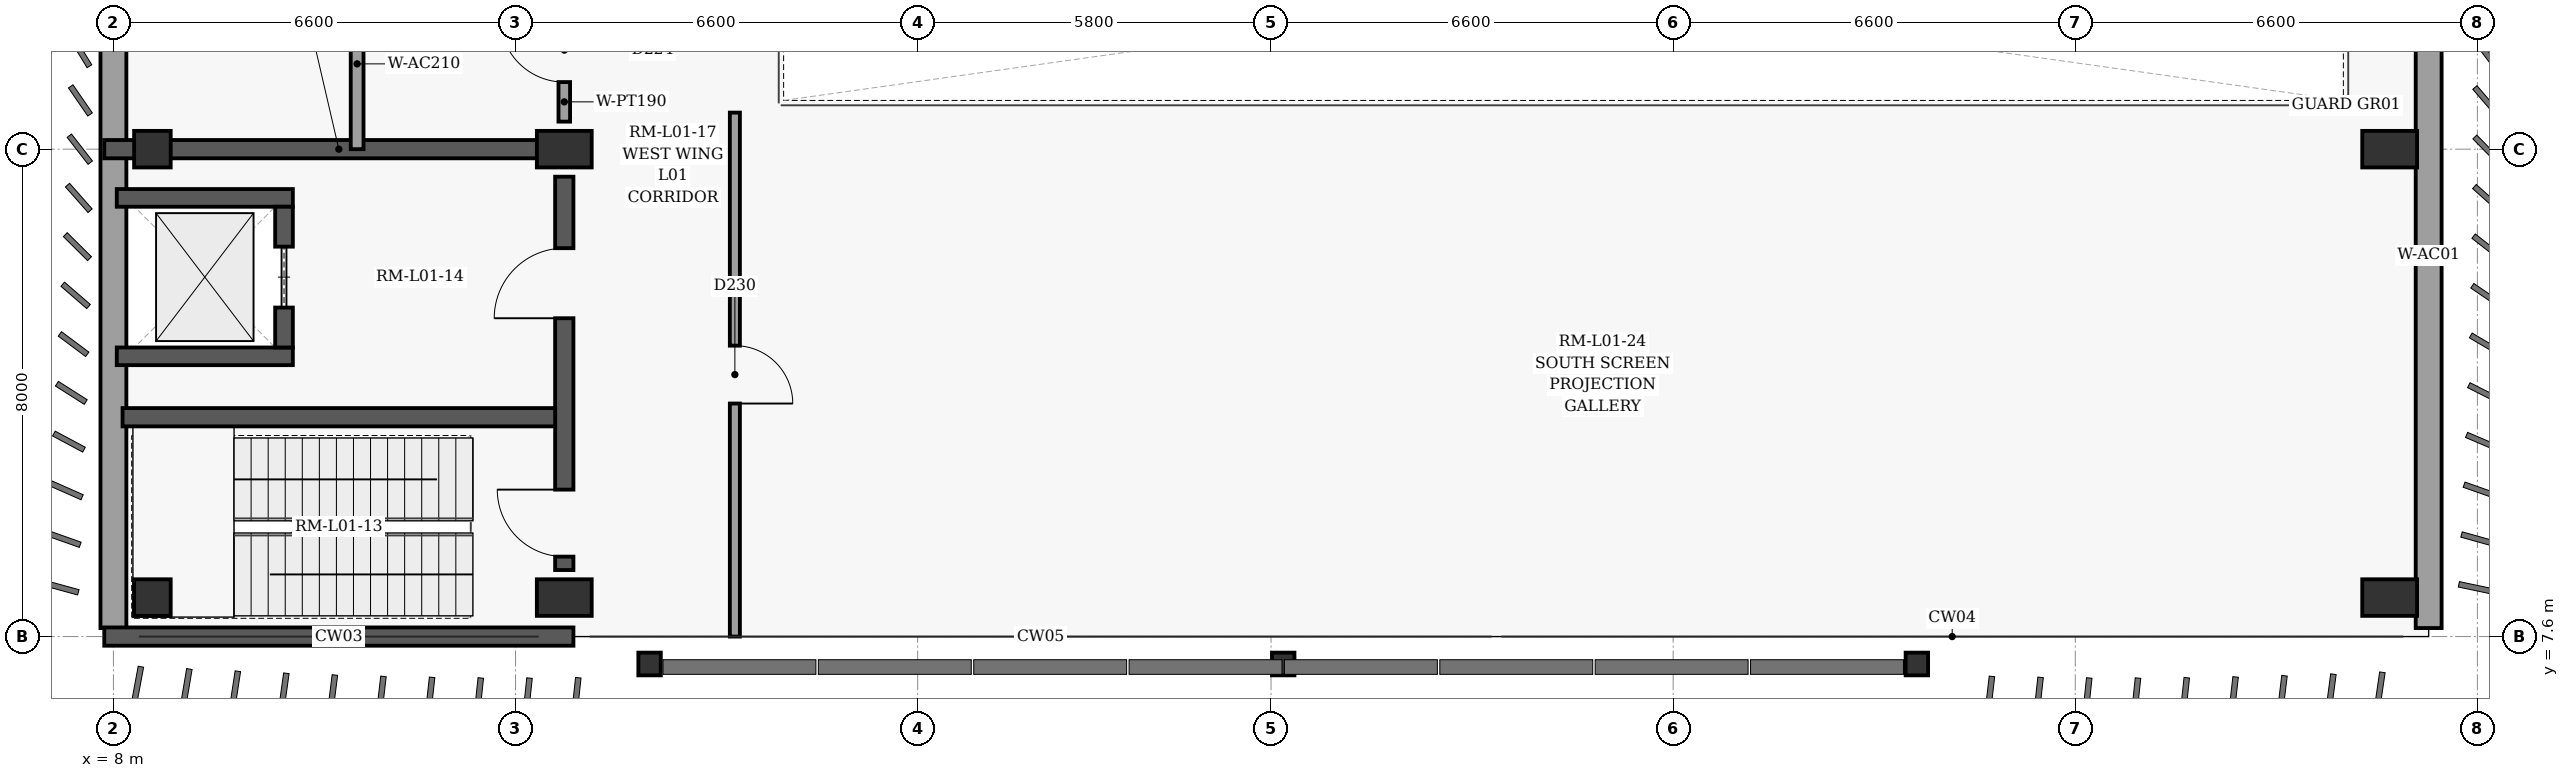
"""IFC4 building model, lengths in metres.
Left out: names, types, materials, properties, quantities, classifications, styles, units other than length and angle.
Written with IfcOpenShell. Run it as: python <this file> out.ifc"""

import sys

from ifc_helpers import new_model, si_unit, direction, frame, frame_2d, origin, origin_2d, place, context, subcontext, project, spatial, rectangle, i_section, extrude, element, fill, save


model = new_model("IFC4")
c1 = context("Model", 3, precision=1e-05, world=origin(), true_north=direction((0.0, 1.0)))
c2 = subcontext(c1, "Body", "Model", "MODEL_VIEW")
j1 = project(units=[si_unit("LENGTHUNIT", "METRE"), si_unit("PLANEANGLEUNIT", "RADIAN")], contexts=[c1])
p1 = place(None, origin())
s1 = spatial("IfcSite", under=j1, at=p1, CompositionType="ELEMENT")
p2 = place(p1, origin())
s2 = spatial("IfcBuilding", under=s1, at=p2, CompositionType="ELEMENT")
p3 = place(p2, frame((0.0, 0.0, 5.4)))
s3 = spatial("IfcBuildingStorey", under=s2, at=p3, CompositionType="ELEMENT", Elevation=5.4)
for number, where, z_axis, x_axis in (
    (1, (8.64, 8.24, 0.0), (0.0, 0.0, 1.0), (1.0, 0.0, 0.0)),
    (2, (8.64, 15.6, 0.0), (0.0, 0.0, 1.0), (1.0, 0.0, 0.0)),
):
    element("IfcColumn", number, at=place(p3, frame(where, z_axis=z_axis, x_axis=x_axis)), inside=s3, PredefinedType="COLUMN", context=c2, shape_type="SweptSolid", body=[
        extrude(rectangle(XDim=0.6, YDim=0.6, at=origin_2d()), origin(), (0.0, 0.0, 1.0), 4.8),
    ])
for number, where, z_axis, x_axis in (
    (3, (15.4, 8.24, 0.0), (0.0, 0.0, 1.0), (1.0, 0.0, 0.0)),
    (4, (15.4, 15.6, 0.0), (0.0, 0.0, 1.0), (1.0, 0.0, 0.0)),
    (5, (45.36, 8.24, 0.0), (0.0, 0.0, 1.0), (1.0, 0.0, 0.0)),
    (6, (45.36, 15.6, 0.0), (0.0, 0.0, 1.0), (1.0, 0.0, 0.0)),
):
    element("IfcColumn", number, at=place(p3, frame(where, z_axis=z_axis, x_axis=x_axis)), inside=s3, PredefinedType="COLUMN", context=c2, shape_type="SweptSolid", body=[
        extrude(rectangle(XDim=0.6, YDim=0.9, at=origin_2d()), origin(), (0.0, 0.0, 1.0), 4.8),
    ])
for number, where, z_axis, x_axis in (
    (7, (16.8, 7.15, 0.0), (0.0, 0.0, 1.0), (1.0, 0.0, 0.0)),
    (8, (27.2, 7.15, 0.0), (0.0, 0.0, 1.0), (1.0, 0.0, 0.0)),
    (9, (37.6, 7.15, 0.0), (0.0, 0.0, 1.0), (1.0, 0.0, 0.0)),
):
    element("IfcColumn", number, at=place(p3, frame(where, z_axis=z_axis, x_axis=x_axis)), inside=s3, PredefinedType="COLUMN", context=c2, shape_type="SweptSolid", body=[
        extrude(i_section(OverallWidth=0.373, OverallDepth=0.368, WebThickness=0.014, FlangeThickness=0.024, at=origin_2d()), origin(), (0.0, 0.0, 1.0), 4.8),
    ])
for number, where, z_axis, x_axis in (
    (10, (46.0, 63.46, 0.0), (0.0, 0.0, 1.0), (0.0, -1.0, 0.0)),
    (11, (8.0, 7.74, 0.0), (0.0, 0.0, 1.0), (0.0, 1.0, 0.0)),
):
    element("IfcWall", number, at=place(p3, frame(where, z_axis=z_axis, x_axis=x_axis)), inside=s3, PredefinedType="SOLIDWALL", context=c2, shape_type="SweptSolid", body=[
        extrude(rectangle(XDim=55.72, YDim=0.425, at=frame_2d((27.86, 0.0))), origin(), (0.0, 0.0, 1.0), 4.52),
    ])
p4 = place(p3, frame((7.85, 7.6, 0.0), z_axis=(0.0, 0.0, 1.0), x_axis=(1.0, 0.0, 0.0)))
e12 = element("IfcWall", 12, at=p4, inside=s3, PredefinedType="SHEAR", context=c2, shape_type="SweptSolid", body=[
    extrude(rectangle(XDim=7.7, YDim=0.3, at=frame_2d((3.85, 0.0))), origin(), (0.0, 0.0, 1.0), 4.52),
])
p5 = place(p3, frame((7.85, 15.6, 0.0), z_axis=(0.0, 0.0, 1.0), x_axis=(1.0, 0.0, 0.0)))
e13 = element("IfcWall", 13, at=p5, inside=s3, PredefinedType="SHEAR", context=c2, shape_type="SweptSolid", body=[
    extrude(rectangle(XDim=7.248, YDim=0.3, at=frame_2d((3.624, 0.0))), origin(), (0.0, 0.0, 1.0), 4.52),
])
p6 = place(p3, frame((15.4, 8.692, 0.0), z_axis=(0.0, 0.0, 1.0), x_axis=(0.0, 1.0, 0.0)))
e14 = element("IfcWall", 14, at=p6, inside=s3, PredefinedType="SHEAR", context=c2, shape_type="SweptSolid", body=[
    extrude(rectangle(XDim=6.456, YDim=0.3, at=frame_2d((3.228, 0.0))), origin(), (0.0, 0.0, 1.0), 4.52),
])
p7 = place(p6, frame((0.22, 0.0, 0.0)))
e15 = element("IfcOpeningElement", 15, at=p7, cuts=e14, PredefinedType="OPENING", context=c2, shape_type="SweptSolid", body=[
    extrude(rectangle(XDim=1.1, YDim=2.15, at=frame_2d((0.55, 1.075))), frame((0.0, 0.16, 0.0), z_axis=(0.0, -1.0, 0.0), x_axis=(1.0, 0.0, 0.0)), (0.0, 0.0, 1.0), 0.32),
])
p8 = place(p6, frame((4.133, 0.0, 0.0)))
e16 = element("IfcOpeningElement", 16, at=p8, cuts=e14, PredefinedType="OPENING", context=c2, shape_type="SweptSolid", body=[
    extrude(rectangle(XDim=1.15, YDim=2.2, at=frame_2d((0.575, 1.1))), frame((0.0, 0.16, 0.0), z_axis=(0.0, -1.0, 0.0), x_axis=(1.0, 0.0, 0.0)), (0.0, 0.0, 1.0), 0.32),
])
p9 = place(p3, frame((8.15, 11.2, 0.0), z_axis=(0.0, 0.0, 1.0), x_axis=(1.0, 0.0, 0.0)))
e17 = element("IfcWall", 17, at=p9, inside=s3, PredefinedType="SHEAR", context=c2, shape_type="SweptSolid", body=[
    extrude(rectangle(XDim=7.1, YDim=0.3, at=frame_2d((3.55, 0.0))), origin(), (0.0, 0.0, 1.0), 4.52),
])
for number, where, z_axis, x_axis in (
    (18, (8.055, 12.2, 0.0), (0.0, 0.0, 1.0), (1.0, 0.0, 0.0)),
    (19, (8.055, 14.8, 0.0), (0.0, 0.0, 1.0), (1.0, 0.0, 0.0)),
):
    element("IfcWall", number, at=place(p3, frame(where, z_axis=z_axis, x_axis=x_axis)), inside=s3, PredefinedType="SHEAR", context=c2, shape_type="SweptSolid", body=[
        extrude(rectangle(XDim=2.89, YDim=0.29, at=frame_2d((1.445, 0.0))), origin(), (0.0, 0.0, 1.0), 4.52),
    ])
p10 = place(p3, frame((10.8, 12.345, 0.0), z_axis=(0.0, 0.0, 1.0), x_axis=(0.0, 1.0, 0.0)))
e20 = element("IfcWall", 20, at=p10, inside=s3, PredefinedType="SHEAR", context=c2, shape_type="SweptSolid", body=[
    extrude(rectangle(XDim=2.31, YDim=0.29, at=frame_2d((1.155, 0.0))), origin(), (0.0, 0.0, 1.0), 4.52),
])
p11 = place(p10, frame((0.655, 0.0, 0.0)))
e21 = element("IfcOpeningElement", 21, at=p11, cuts=e20, PredefinedType="OPENING", context=c2, shape_type="SweptSolid", body=[
    extrude(rectangle(XDim=1.0, YDim=2.15, at=frame_2d((0.5, 1.075))), frame((0.0, 0.155, 0.0), z_axis=(0.0, -1.0, 0.0), x_axis=(1.0, 0.0, 0.0)), (0.0, 0.0, 1.0), 0.31),
])
p12 = place(p3, frame((15.4, 16.052, 0.0), z_axis=(0.0, 0.0, 1.0), x_axis=(0.0, 1.0, 0.0)))
e22 = element("IfcWall", 22, at=p12, inside=s3, PredefinedType="PARTITIONING", context=c2, shape_type="SweptSolid", body=[
    extrude(rectangle(XDim=2.348, YDim=0.19, at=frame_2d((1.174, 0.0))), origin(), (0.0, 0.0, 1.0), 3.67),
])
p13 = place(p12, frame((0.649, 0.0, 0.0)))
e23 = element("IfcOpeningElement", 23, at=p13, cuts=e22, PredefinedType="OPENING", context=c2, shape_type="SweptSolid", body=[
    extrude(rectangle(XDim=1.05, YDim=2.15, at=frame_2d((0.525, 1.075))), frame((0.0, 0.105, 0.0), z_axis=(0.0, -1.0, 0.0), x_axis=(1.0, 0.0, 0.0)), (0.0, 0.0, 1.0), 0.21),
])
p14 = place(p3, frame((18.2, 16.2, 0.0), z_axis=(0.0, 0.0, 1.0), x_axis=(0.0, -1.0, 0.0)))
e24 = element("IfcWall", 24, at=p14, inside=s3, PredefinedType="PARTITIONING", context=c2, shape_type="SweptSolid", body=[
    extrude(rectangle(XDim=8.6, YDim=0.165, at=frame_2d((4.3, 0.0))), origin(), (0.0, 0.0, 1.0), 4.52),
])
p15 = place(p14, frame((3.825, 0.0, 0.0)))
e25 = element("IfcOpeningElement", 25, at=p15, cuts=e24, PredefinedType="OPENING", context=c2, shape_type="SweptSolid", body=[
    extrude(rectangle(XDim=0.95, YDim=2.1, at=frame_2d((0.475, 1.05))), frame((0.0, 0.093, 0.0), z_axis=(0.0, -1.0, 0.0), x_axis=(1.0, 0.0, 0.0)), (0.0, 0.0, 1.0), 0.185),
])
p16 = place(p3, frame((12.0, 15.6, 0.0), z_axis=(0.0, 0.0, 1.0), x_axis=(0.0, 1.0, 0.0)))
e26 = element("IfcWall", 26, at=p16, inside=s3, PredefinedType="PARTITIONING", context=c2, shape_type="SweptSolid", body=[
    extrude(rectangle(XDim=2.8, YDim=0.21, at=frame_2d((1.4, 0.0))), origin(), (0.0, 0.0, 1.0), 4.52),
])
p17 = place(p7, origin())
e27 = element("IfcDoor", 27, at=p17, inside=s3, OperationType="SINGLE_SWING_RIGHT", PredefinedType="DOOR", context=c2, shape_type="SweptSolid", body=[
    extrude(rectangle(XDim=1.1, YDim=2.15, at=frame_2d((0.55, 1.075))), frame((0.0, 0.025, 0.0), z_axis=(0.0, -1.0, 0.0), x_axis=(1.0, 0.0, 0.0)), (0.0, 0.0, 1.0), 0.05),
])
fill(e15, e27)
p18 = place(p8, origin())
e28 = element("IfcDoor", 28, at=p18, inside=s3, OperationType="SINGLE_SWING_LEFT", PredefinedType="DOOR", context=c2, shape_type="SweptSolid", body=[
    extrude(rectangle(XDim=1.15, YDim=2.2, at=frame_2d((0.575, 1.1))), frame((0.0, 0.025, 0.0), z_axis=(0.0, -1.0, 0.0), x_axis=(1.0, 0.0, 0.0)), (0.0, 0.0, 1.0), 0.05),
])
fill(e16, e28)
p19 = place(p11, origin())
e29 = element("IfcDoor", 29, at=p19, inside=s3, OperationType="SLIDING_TO_LEFT", PredefinedType="DOOR", context=c2, shape_type="SweptSolid", body=[
    extrude(rectangle(XDim=1.0, YDim=2.15, at=frame_2d((0.5, 1.075))), frame((0.0, 0.025, 0.0), z_axis=(0.0, -1.0, 0.0), x_axis=(1.0, 0.0, 0.0)), (0.0, 0.0, 1.0), 0.05),
])
fill(e21, e29)
p20 = place(p13, origin())
e30 = element("IfcDoor", 30, at=p20, inside=s3, OperationType="SINGLE_SWING_RIGHT", PredefinedType="DOOR", context=c2, shape_type="SweptSolid", body=[
    extrude(rectangle(XDim=1.05, YDim=2.15, at=frame_2d((0.525, 1.075))), frame((0.0, 0.025, 0.0), z_axis=(0.0, -1.0, 0.0), x_axis=(1.0, 0.0, 0.0)), (0.0, 0.0, 1.0), 0.05),
])
fill(e23, e30)
p21 = place(p15, origin())
e31 = element("IfcDoor", 31, at=p21, inside=s3, OperationType="SINGLE_SWING_RIGHT", PredefinedType="DOOR", context=c2, shape_type="SweptSolid", body=[
    extrude(rectangle(XDim=0.95, YDim=2.1, at=frame_2d((0.475, 1.05))), frame((0.0, 0.025, 0.0), z_axis=(0.0, -1.0, 0.0), x_axis=(1.0, 0.0, 0.0)), (0.0, 0.0, 1.0), 0.05),
])
fill(e25, e31)
save(model, sys.argv[1])
